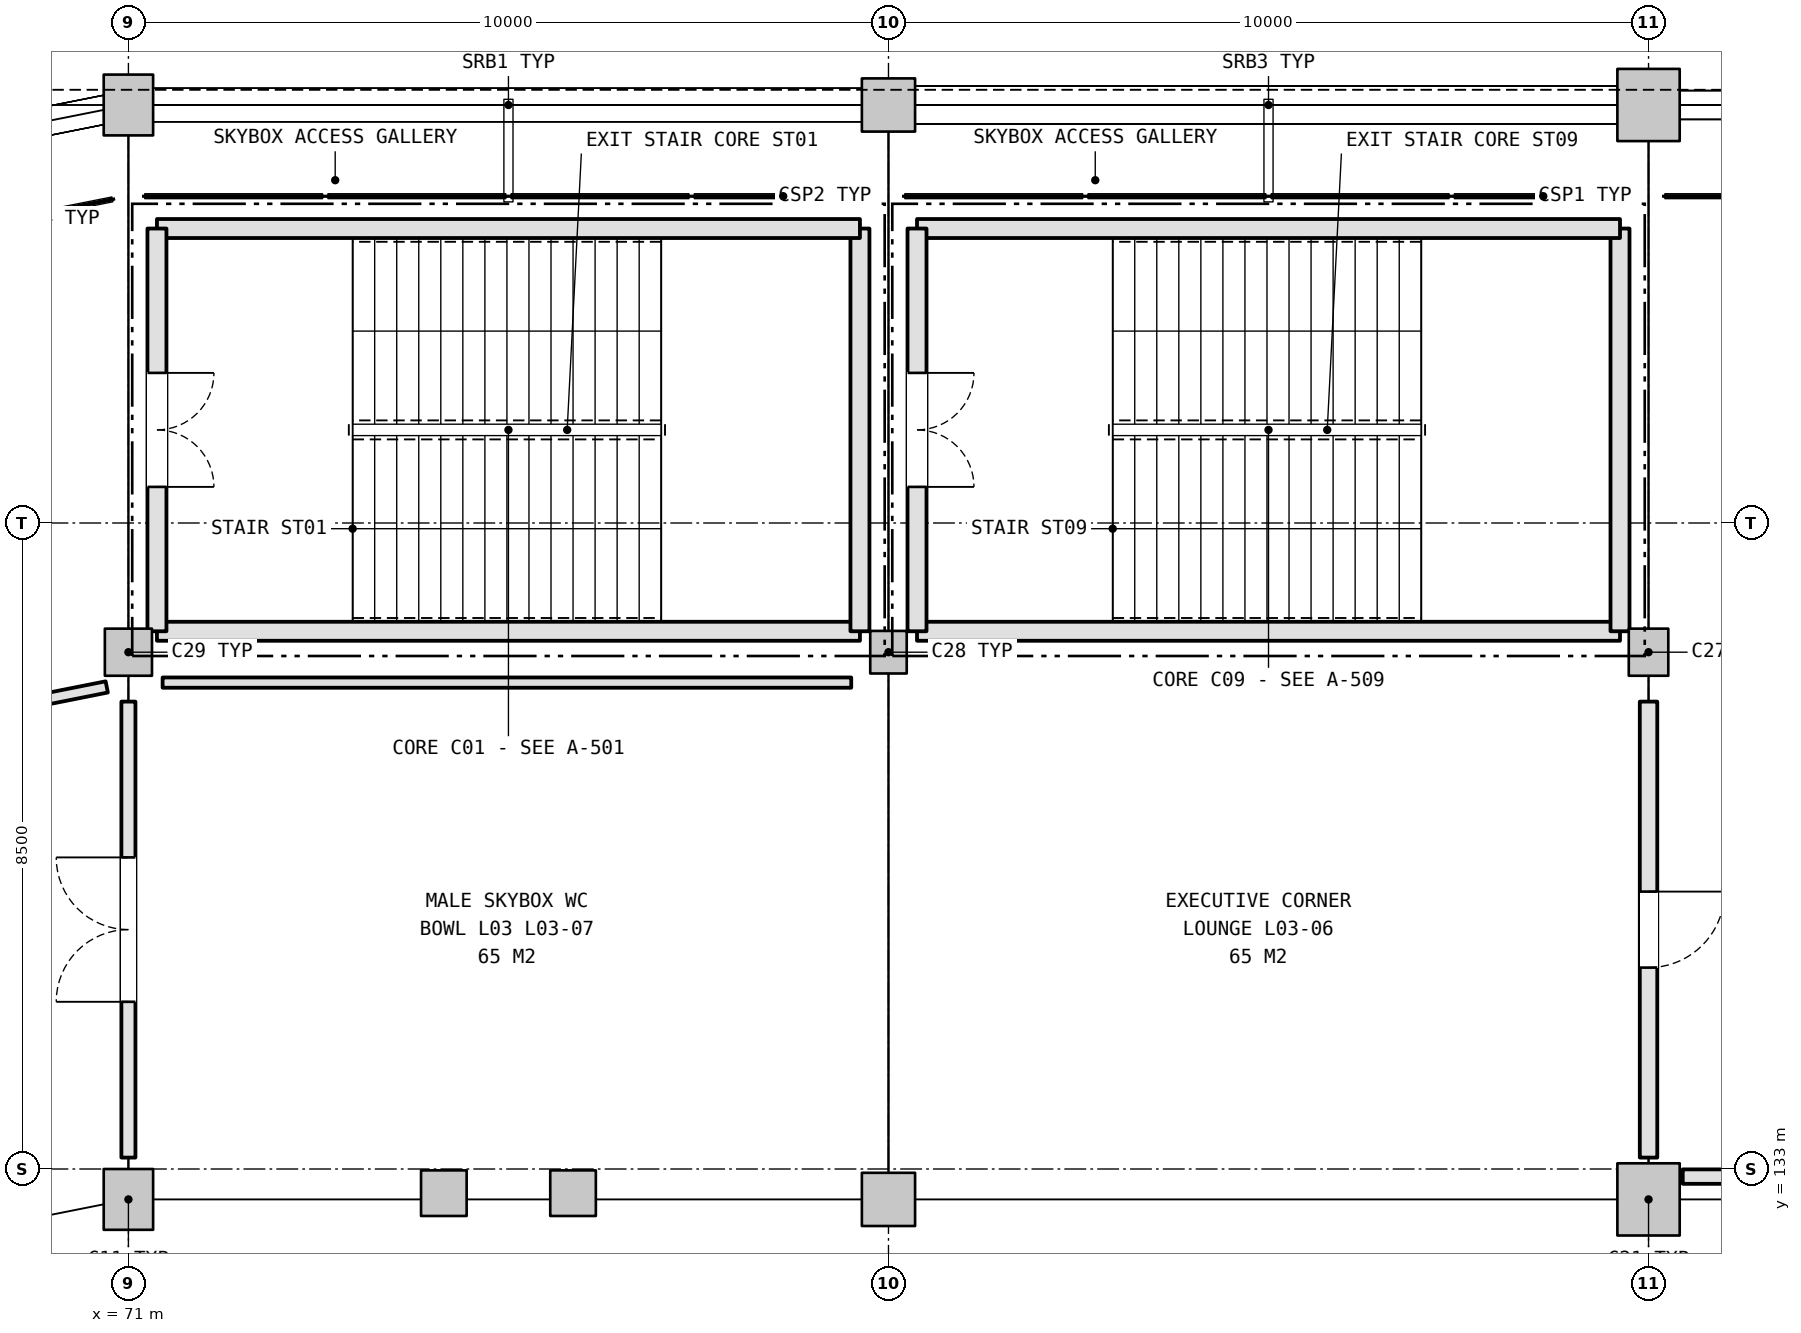
"""IFC4 building model, lengths in metres.
Left out: names, types, materials, properties, quantities, classifications, styles, units other than length and angle.
Written with IfcOpenShell. Run it as: python <this file> out.ifc"""

import sys

from ifc_helpers import new_model, si_unit, direction, frame, frame_2d, origin, origin_2d, place, context, subcontext, project, spatial, rectangle, extrude, element, fill, save


model = new_model("IFC4")
c1 = context("Model", 3, precision=1e-05, world=origin(), true_north=direction((0.0, 1.0)))
c2 = subcontext(c1, "Body", "Model", "MODEL_VIEW")
j1 = project(units=[si_unit("LENGTHUNIT", "METRE"), si_unit("PLANEANGLEUNIT", "RADIAN")], contexts=[c1])
p1 = place(None, origin())
s1 = spatial("IfcSite", under=j1, at=p1, CompositionType="ELEMENT")
p2 = place(p1, origin())
s2 = spatial("IfcBuilding", under=s1, at=p2, CompositionType="ELEMENT")
p3 = place(p2, frame((0.0, 0.0, 16.2)))
s3 = spatial("IfcBuildingStorey", under=s2, at=p3, CompositionType="ELEMENT", Elevation=16.2)
p4 = place(p3, frame((91.0, 132.6, 0.0), z_axis=(0.0, 0.0, 1.0), x_axis=(1.0, 0.0, 0.0)))
e1 = element("IfcColumn", 1, at=p4, inside=s3, PredefinedType="COLUMN", context=c2, shape_type="SweptSolid", body=[
    extrude(rectangle(XDim=0.82, YDim=0.95, at=origin_2d()), origin(), (0.0, 0.0, 1.0), 5.4),
])
p5 = place(p3, frame((91.0, 139.8, 0.0), z_axis=(0.0, 0.0, 1.0), x_axis=(1.0, 0.0, 0.0)))
e2 = element("IfcColumn", 2, at=p5, inside=s3, PredefinedType="COLUMN", context=c2, shape_type="SweptSolid", body=[
    extrude(rectangle(XDim=0.52, YDim=0.62, at=origin_2d()), origin(), (0.0, 0.0, 1.0), 5.4),
])
p6 = place(p3, frame((91.0, 147.0, 0.0), z_axis=(0.0, 0.0, 1.0), x_axis=(1.0, 0.0, 0.0)))
e3 = element("IfcColumn", 3, at=p6, inside=s3, PredefinedType="COLUMN", context=c2, shape_type="SweptSolid", body=[
    extrude(rectangle(XDim=0.82, YDim=0.95, at=origin_2d()), origin(), (0.0, 0.0, 1.0), 5.4),
])
p7 = place(p3, frame((81.0, 132.6, 0.0), z_axis=(0.0, 0.0, 1.0), x_axis=(1.0, 0.0, 0.0)))
e4 = element("IfcColumn", 4, at=p7, inside=s3, PredefinedType="COLUMN", context=c2, shape_type="SweptSolid", body=[
    extrude(rectangle(XDim=0.7, YDim=0.7, at=origin_2d()), origin(), (0.0, 0.0, 1.0), 5.4),
])
p8 = place(p3, frame((81.0, 139.8, 0.0), z_axis=(0.0, 0.0, 1.0), x_axis=(1.0, 0.0, 0.0)))
e5 = element("IfcColumn", 5, at=p8, inside=s3, PredefinedType="COLUMN", context=c2, shape_type="SweptSolid", body=[
    extrude(rectangle(XDim=0.48, YDim=0.56, at=origin_2d()), origin(), (0.0, 0.0, 1.0), 5.4),
])
p9 = place(p3, frame((81.0, 147.0, 0.0), z_axis=(0.0, 0.0, 1.0), x_axis=(1.0, 0.0, 0.0)))
e6 = element("IfcColumn", 6, at=p9, inside=s3, PredefinedType="COLUMN", context=c2, shape_type="SweptSolid", body=[
    extrude(rectangle(XDim=0.7, YDim=0.7, at=origin_2d()), origin(), (0.0, 0.0, 1.0), 5.4),
])
p10 = place(p3, frame((71.0, 132.6, 0.0), z_axis=(0.0, 0.0, 1.0), x_axis=(1.0, 0.0, 0.0)))
e7 = element("IfcColumn", 7, at=p10, inside=s3, PredefinedType="COLUMN", context=c2, shape_type="SweptSolid", body=[
    extrude(rectangle(XDim=0.65, YDim=0.8, at=origin_2d()), origin(), (0.0, 0.0, 1.0), 5.4),
])
p11 = place(p3, frame((71.0, 139.8, 0.0), z_axis=(0.0, 0.0, 1.0), x_axis=(1.0, 0.0, 0.0)))
e8 = element("IfcColumn", 8, at=p11, inside=s3, PredefinedType="COLUMN", context=c2, shape_type="SweptSolid", body=[
    extrude(rectangle(XDim=0.62, YDim=0.62, at=origin_2d()), origin(), (0.0, 0.0, 1.0), 5.4),
])
p12 = place(p3, frame((71.0, 147.0, 0.0), z_axis=(0.0, 0.0, 1.0), x_axis=(1.0, 0.0, 0.0)))
e9 = element("IfcColumn", 9, at=p12, inside=s3, PredefinedType="COLUMN", context=c2, shape_type="SweptSolid", body=[
    extrude(rectangle(XDim=0.65, YDim=0.8, at=origin_2d()), origin(), (0.0, 0.0, 1.0), 5.4),
])
p13 = place(p3, frame((71.375, 140.075, 0.0), z_axis=(0.0, 0.0, 1.0), x_axis=(1.0, 0.0, 0.0)))
e10 = element("IfcWall", 10, at=p13, inside=s3, PredefinedType="SHEAR", context=c2, shape_type="SweptSolid", body=[
    extrude(rectangle(XDim=9.249, YDim=0.25, at=frame_2d((4.625, 0.0))), origin(), (0.0, 0.0, 1.0), 5.14),
])
p14 = place(p3, frame((80.625, 140.075, 0.0), z_axis=(0.0, 0.0, 1.0), x_axis=(0.0, 1.0, 0.0)))
e11 = element("IfcWall", 11, at=p14, inside=s3, PredefinedType="SHEAR", context=c2, shape_type="SweptSolid", body=[
    extrude(rectangle(XDim=5.299, YDim=0.25, at=frame_2d((2.649, 0.0))), origin(), (0.0, 0.0, 1.0), 5.14),
])
p15 = place(p3, frame((80.625, 145.375, 0.0), z_axis=(0.0, 0.0, 1.0), x_axis=(-1.0, 0.0, 0.0)))
e12 = element("IfcWall", 12, at=p15, inside=s3, PredefinedType="SHEAR", context=c2, shape_type="SweptSolid", body=[
    extrude(rectangle(XDim=9.249, YDim=0.25, at=frame_2d((4.625, 0.0))), origin(), (0.0, 0.0, 1.0), 5.14),
])
p16 = place(p3, frame((71.375, 145.375, 0.0), z_axis=(0.0, 0.0, 1.0), x_axis=(0.0, -1.0, 0.0)))
e13 = element("IfcWall", 13, at=p16, inside=s3, PredefinedType="SHEAR", context=c2, shape_type="SweptSolid", body=[
    extrude(rectangle(XDim=5.299, YDim=0.25, at=frame_2d((2.649, 0.0))), origin(), (0.0, 0.0, 1.0), 5.14),
])
p17 = place(p16, frame((1.9, 0.0, 0.0)))
e14 = element("IfcOpeningElement", 14, at=p17, cuts=e13, PredefinedType="OPENING", context=c2, shape_type="SweptSolid", body=[
    extrude(rectangle(XDim=1.5, YDim=2.2, at=frame_2d((0.75, 1.1))), frame((0.0, 0.135, 0.0), z_axis=(0.0, -1.0, 0.0), x_axis=(1.0, 0.0, 0.0)), (0.0, 0.0, 1.0), 0.27),
])
p18 = place(p3, frame((81.375, 140.075, 0.0), z_axis=(0.0, 0.0, 1.0), x_axis=(1.0, 0.0, 0.0)))
e15 = element("IfcWall", 15, at=p18, inside=s3, PredefinedType="SHEAR", context=c2, shape_type="SweptSolid", body=[
    extrude(rectangle(XDim=9.249, YDim=0.25, at=frame_2d((4.625, 0.0))), origin(), (0.0, 0.0, 1.0), 5.14),
])
p19 = place(p3, frame((90.625, 140.075, 0.0), z_axis=(0.0, 0.0, 1.0), x_axis=(0.0, 1.0, 0.0)))
e16 = element("IfcWall", 16, at=p19, inside=s3, PredefinedType="SHEAR", context=c2, shape_type="SweptSolid", body=[
    extrude(rectangle(XDim=5.299, YDim=0.25, at=frame_2d((2.649, 0.0))), origin(), (0.0, 0.0, 1.0), 5.14),
])
p20 = place(p3, frame((90.625, 145.375, 0.0), z_axis=(0.0, 0.0, 1.0), x_axis=(-1.0, 0.0, 0.0)))
e17 = element("IfcWall", 17, at=p20, inside=s3, PredefinedType="SHEAR", context=c2, shape_type="SweptSolid", body=[
    extrude(rectangle(XDim=9.249, YDim=0.25, at=frame_2d((4.625, 0.0))), origin(), (0.0, 0.0, 1.0), 5.14),
])
p21 = place(p3, frame((81.375, 145.375, 0.0), z_axis=(0.0, 0.0, 1.0), x_axis=(0.0, -1.0, 0.0)))
e18 = element("IfcWall", 18, at=p21, inside=s3, PredefinedType="SHEAR", context=c2, shape_type="SweptSolid", body=[
    extrude(rectangle(XDim=5.299, YDim=0.25, at=frame_2d((2.649, 0.0))), origin(), (0.0, 0.0, 1.0), 5.14),
])
p22 = place(p21, frame((1.9, 0.0, 0.0)))
e19 = element("IfcOpeningElement", 19, at=p22, cuts=e18, PredefinedType="OPENING", context=c2, shape_type="SweptSolid", body=[
    extrude(rectangle(XDim=1.5, YDim=2.2, at=frame_2d((0.75, 1.1))), frame((0.0, 0.135, 0.0), z_axis=(0.0, -1.0, 0.0), x_axis=(1.0, 0.0, 0.0)), (0.0, 0.0, 1.0), 0.27),
])
for number, where, z_axis, x_axis in (
    (20, (75.15, 132.682, 0.0), (0.0, 0.0, 1.0), (1.0, 0.0, 0.0)),
    (21, (76.85, 132.682, 0.0), (0.0, 0.0, 1.0), (1.0, 0.0, 0.0)),
):
    element("IfcColumn", number, at=place(p3, frame(where, z_axis=z_axis, x_axis=x_axis)), inside=s3, PredefinedType="COLUMN", context=c2, shape_type="SweptSolid", body=[
        extrude(rectangle(XDim=0.6, YDim=0.6, at=origin_2d()), origin(), (0.0, 0.0, 1.0), 5.4),
    ])
p23 = place(p3, frame((91.0, 133.15, 0.0), z_axis=(0.0, 0.0, 1.0), x_axis=(0.0, 1.0, 0.0)))
e22 = element("IfcWall", 22, at=p23, inside=s3, PredefinedType="PLUMBINGWALL", context=c2, shape_type="SweptSolid", body=[
    extrude(rectangle(XDim=6.0, YDim=0.23, at=frame_2d((3.0, 0.0))), origin(), (0.0, 0.0, 1.0), 4.305),
])
p24 = place(p23, frame((2.5, 0.0, 0.0)))
e23 = element("IfcOpeningElement", 23, at=p24, cuts=e22, PredefinedType="OPENING", context=c2, shape_type="SweptSolid", body=[
    extrude(rectangle(XDim=1.0, YDim=2.1, at=frame_2d((0.5, 1.05))), frame((0.0, 0.125, 0.0), z_axis=(0.0, -1.0, 0.0), x_axis=(1.0, 0.0, 0.0)), (0.0, 0.0, 1.0), 0.25),
])
p25 = place(p3, frame((100.51, 132.9, 0.0), z_axis=(0.0, 0.0, 1.0), x_axis=(-1.0, 0.0, 0.0)))
e24 = element("IfcWall", 24, at=p25, inside=s3, PredefinedType="PARTITIONING", context=c2, shape_type="SweptSolid", body=[
    extrude(rectangle(XDim=9.06, YDim=0.19, at=frame_2d((4.53, 0.0))), origin(), (0.0, 0.0, 1.0), 4.505),
])
p26 = place(p3, frame((71.0, 133.15, 0.0), z_axis=(0.0, 0.0, 1.0), x_axis=(0.0, 1.0, 0.0)))
e25 = element("IfcWall", 25, at=p26, inside=s3, PredefinedType="PARTITIONING", context=c2, shape_type="SweptSolid", body=[
    extrude(rectangle(XDim=6.0, YDim=0.185, at=frame_2d((3.0, 0.0))), origin(), (0.0, 0.0, 1.0), 4.375),
])
p27 = place(p26, frame((2.05, 0.0, 0.0)))
e26 = element("IfcOpeningElement", 26, at=p27, cuts=e25, PredefinedType="OPENING", context=c2, shape_type="SweptSolid", body=[
    extrude(rectangle(XDim=1.9, YDim=2.3, at=frame_2d((0.95, 1.15))), frame((0.0, 0.103, 0.0), z_axis=(0.0, -1.0, 0.0), x_axis=(1.0, 0.0, 0.0)), (0.0, 0.0, 1.0), 0.205),
])
p28 = place(p3, frame((71.45, 139.4, 0.0), z_axis=(0.0, 0.0, 1.0), x_axis=(1.0, 0.0, 0.0)))
e27 = element("IfcWall", 27, at=p28, inside=s3, PredefinedType="PARTITIONING", context=c2, shape_type="SweptSolid", body=[
    extrude(rectangle(XDim=9.06, YDim=0.135, at=frame_2d((4.53, 0.0))), origin(), (0.0, 0.0, 1.0), 5.12),
])
p29 = place(p3, frame((54.254, 136.069, 0.0), z_axis=(0.0, 0.0, 1.0), x_axis=(0.980786027867, 0.195086564225, 0.0)))
e28 = element("IfcWall", 28, at=p29, inside=s3, PredefinedType="PARTITIONING", context=c2, shape_type="SweptSolid", body=[
    extrude(rectangle(XDim=16.783, YDim=0.15, at=frame_2d((8.392, 0.0))), origin(), (0.0, 0.0, 1.0), 4.375),
])
p30 = place(p29, frame((7.617, 0.0, 0.0)))
e29 = element("IfcOpeningElement", 29, at=p30, cuts=e28, PredefinedType="OPENING", context=c2, shape_type="SweptSolid", body=[
    extrude(rectangle(XDim=1.55, YDim=2.15, at=frame_2d((0.775, 1.075))), frame((0.0, 0.085, 0.0), z_axis=(0.0, -1.0, 0.0), x_axis=(1.0, 0.0, 0.0)), (0.0, 0.0, 1.0), 0.17),
])
p31 = place(p17, origin())
e30 = element("IfcDoor", 30, at=p31, inside=s3, OperationType="DOUBLE_DOOR_SINGLE_SWING", PredefinedType="DOOR", context=c2, shape_type="SweptSolid", body=[
    extrude(rectangle(XDim=1.5, YDim=2.2, at=frame_2d((0.75, 1.1))), frame((0.0, 0.025, 0.0), z_axis=(0.0, -1.0, 0.0), x_axis=(1.0, 0.0, 0.0)), (0.0, 0.0, 1.0), 0.05),
])
fill(e14, e30)
p32 = place(p22, origin())
e31 = element("IfcDoor", 31, at=p32, inside=s3, OperationType="DOUBLE_DOOR_SINGLE_SWING", PredefinedType="DOOR", context=c2, shape_type="SweptSolid", body=[
    extrude(rectangle(XDim=1.5, YDim=2.2, at=frame_2d((0.75, 1.1))), frame((0.0, 0.025, 0.0), z_axis=(0.0, -1.0, 0.0), x_axis=(1.0, 0.0, 0.0)), (0.0, 0.0, 1.0), 0.05),
])
fill(e19, e31)
p33 = place(p24, frame((1.0, 0.0, 0.0), z_axis=(0.0, 0.0, 1.0), x_axis=(-1.0, 0.0, 0.0)))
e32 = element("IfcDoor", 32, at=p33, inside=s3, OperationType="SINGLE_SWING_RIGHT", PredefinedType="DOOR", context=c2, shape_type="SweptSolid", body=[
    extrude(rectangle(XDim=1.0, YDim=2.1, at=frame_2d((0.5, 1.05))), frame((0.0, 0.025, 0.0), z_axis=(0.0, -1.0, 0.0), x_axis=(1.0, 0.0, 0.0)), (0.0, 0.0, 1.0), 0.05),
])
fill(e23, e32)
p34 = place(p27, origin())
e33 = element("IfcDoor", 33, at=p34, inside=s3, OperationType="DOUBLE_DOOR_SINGLE_SWING", PredefinedType="DOOR", context=c2, shape_type="SweptSolid", body=[
    extrude(rectangle(XDim=1.9, YDim=2.3, at=frame_2d((0.95, 1.15))), frame((0.0, 0.025, 0.0), z_axis=(0.0, -1.0, 0.0), x_axis=(1.0, 0.0, 0.0)), (0.0, 0.0, 1.0), 0.05),
])
fill(e26, e33)
save(model, sys.argv[1])
